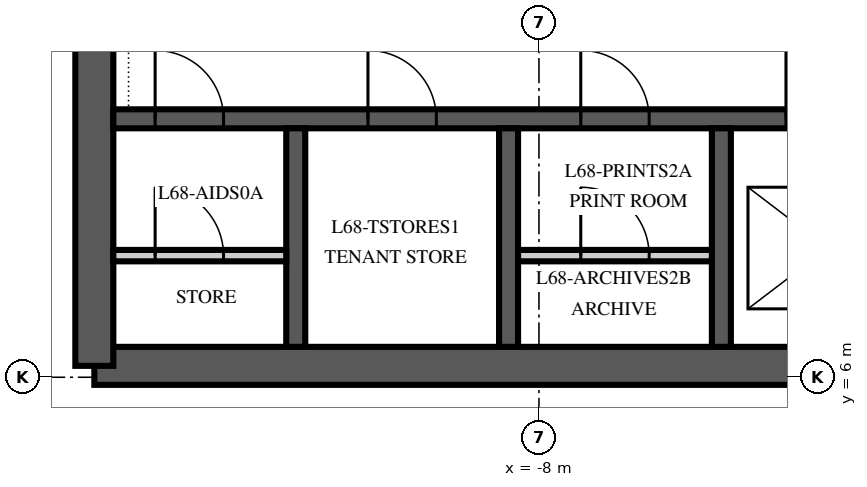
"""IFC4 building model, lengths in metres.
Left out: names, types, materials, properties, quantities, classifications, styles, units other than length and angle.
Written with IfcOpenShell. Run it as: python <this file> out.ifc"""

import sys

from ifc_helpers import new_model, si_unit, direction, frame, frame_2d, origin, place, context, subcontext, project, spatial, polyline, rectangle, outline, extrude, element, fill, save


model = new_model("IFC4")
c1 = context("Model", 3, precision=1e-05, world=origin(), true_north=direction((0.0, 1.0)))
c2 = subcontext(c1, "Body", "Model", "MODEL_VIEW")
j1 = project(units=[si_unit("LENGTHUNIT", "METRE"), si_unit("PLANEANGLEUNIT", "RADIAN")], contexts=[c1])
p1 = place(None, origin())
s1 = spatial("IfcSite", under=j1, at=p1, CompositionType="ELEMENT")
p2 = place(p1, origin())
s2 = spatial("IfcBuilding", under=s1, at=p2, CompositionType="ELEMENT")
p3 = place(p2, frame((0.0, 0.0, 292.0)))
s3 = spatial("IfcBuildingStorey", under=s2, at=p3, CompositionType="ELEMENT", Elevation=292.0)
p4 = place(p3, frame((-13.85, 6.15, 0.0), z_axis=(0.0, 0.0, 1.0), x_axis=(1.0, 0.0, 0.0)))
e1 = element("IfcWall", 1, at=p4, inside=s3, PredefinedType="SHEAR", context=c2, shape_type="SweptSolid", body=[
    extrude(rectangle(XDim=27.7, YDim=0.5, at=frame_2d((13.85, 0.0))), origin(), (0.0, 0.0, 1.0), 4.0),
])
p5 = place(p3, frame((-13.85, 23.85, 0.0), z_axis=(0.0, 0.0, 1.0), x_axis=(0.0, -1.0, 0.0)))
e2 = element("IfcWall", 2, at=p5, inside=s3, PredefinedType="SHEAR", context=c2, shape_type="SweptSolid", body=[
    extrude(outline(polyline([(0.0, -0.25), (17.7, -0.25), (17.7, 0.0), (17.45, 0.0), (17.45, 0.25), (0.25, 0.25), (0.25, 0.0), (0.0, 0.0), (0.0, -0.25)])), origin(), (0.0, 0.0, 1.0), 4.0),
])
p6 = place(p5, frame((11.75, 0.0, 0.0)))
e3 = element("IfcOpeningElement", 3, at=p6, cuts=e2, PredefinedType="OPENING", context=c2, shape_type="SweptSolid", body=[
    extrude(rectangle(XDim=1.8, YDim=2.4, at=frame_2d((0.9, 1.2))), frame((0.0, 0.265, 0.0), z_axis=(0.0, -1.0, 0.0), x_axis=(1.0, 0.0, 0.0)), (0.0, 0.0, 1.0), 0.53),
])
p7 = place(p3, frame((-13.6, 9.4, 0.0), z_axis=(0.0, 0.0, 1.0), x_axis=(1.0, 0.0, 0.0)))
e4 = element("IfcWall", 4, at=p7, inside=s3, PredefinedType="SHEAR", context=c2, shape_type="SweptSolid", body=[
    extrude(rectangle(XDim=27.2, YDim=0.25, at=frame_2d((13.6, 0.0))), origin(), (0.0, 0.0, 1.0), 4.0),
])
p8 = place(p7, frame((8.85, 0.0, 0.0)))
e5 = element("IfcOpeningElement", 5, at=p8, cuts=e4, PredefinedType="OPENING", context=c2, shape_type="SweptSolid", body=[
    extrude(rectangle(XDim=1.1, YDim=2.1, at=frame_2d((0.55, 1.05))), frame((0.0, 0.14, 0.0), z_axis=(0.0, -1.0, 0.0), x_axis=(1.0, 0.0, 0.0)), (0.0, 0.0, 1.0), 0.28),
])
p9 = place(p7, frame((11.65, 0.0, 0.0)))
e6 = element("IfcOpeningElement", 6, at=p9, cuts=e4, PredefinedType="OPENING", context=c2, shape_type="SweptSolid", body=[
    extrude(rectangle(XDim=1.1, YDim=2.1, at=frame_2d((0.55, 1.05))), frame((0.0, 0.14, 0.0), z_axis=(0.0, -1.0, 0.0), x_axis=(1.0, 0.0, 0.0)), (0.0, 0.0, 1.0), 0.28),
])
p10 = place(p7, frame((14.45, 0.0, 0.0)))
e7 = element("IfcOpeningElement", 7, at=p10, cuts=e4, PredefinedType="OPENING", context=c2, shape_type="SweptSolid", body=[
    extrude(rectangle(XDim=1.1, YDim=2.1, at=frame_2d((0.55, 1.05))), frame((0.0, 0.14, 0.0), z_axis=(0.0, -1.0, 0.0), x_axis=(1.0, 0.0, 0.0)), (0.0, 0.0, 1.0), 0.28),
])
p11 = place(p7, frame((0.55, 0.0, 0.0)))
e8 = element("IfcOpeningElement", 8, at=p11, cuts=e4, PredefinedType="OPENING", context=c2, shape_type="SweptSolid", body=[
    extrude(rectangle(XDim=0.9, YDim=2.1, at=frame_2d((0.45, 1.05))), frame((0.0, 0.14, 0.0), z_axis=(0.0, -1.0, 0.0), x_axis=(1.0, 0.0, 0.0)), (0.0, 0.0, 1.0), 0.28),
])
p12 = place(p7, frame((3.35, 0.0, 0.0)))
e9 = element("IfcOpeningElement", 9, at=p12, cuts=e4, PredefinedType="OPENING", context=c2, shape_type="SweptSolid", body=[
    extrude(rectangle(XDim=0.9, YDim=2.1, at=frame_2d((0.45, 1.05))), frame((0.0, 0.14, 0.0), z_axis=(0.0, -1.0, 0.0), x_axis=(1.0, 0.0, 0.0)), (0.0, 0.0, 1.0), 0.28),
])
p13 = place(p7, frame((6.15, 0.0, 0.0)))
e10 = element("IfcOpeningElement", 10, at=p13, cuts=e4, PredefinedType="OPENING", context=c2, shape_type="SweptSolid", body=[
    extrude(rectangle(XDim=0.9, YDim=2.1, at=frame_2d((0.45, 1.05))), frame((0.0, 0.14, 0.0), z_axis=(0.0, -1.0, 0.0), x_axis=(1.0, 0.0, 0.0)), (0.0, 0.0, 1.0), 0.28),
])
p14 = place(p7, frame((17.35, 0.0, 0.0)))
e11 = element("IfcOpeningElement", 11, at=p14, cuts=e4, PredefinedType="OPENING", context=c2, shape_type="SweptSolid", body=[
    extrude(rectangle(XDim=0.9, YDim=2.1, at=frame_2d((0.45, 1.05))), frame((0.0, 0.14, 0.0), z_axis=(0.0, -1.0, 0.0), x_axis=(1.0, 0.0, 0.0)), (0.0, 0.0, 1.0), 0.28),
])
p15 = place(p7, frame((20.15, 0.0, 0.0)))
e12 = element("IfcOpeningElement", 12, at=p15, cuts=e4, PredefinedType="OPENING", context=c2, shape_type="SweptSolid", body=[
    extrude(rectangle(XDim=0.9, YDim=2.1, at=frame_2d((0.45, 1.05))), frame((0.0, 0.14, 0.0), z_axis=(0.0, -1.0, 0.0), x_axis=(1.0, 0.0, 0.0)), (0.0, 0.0, 1.0), 0.28),
])
p16 = place(p7, frame((22.95, 0.0, 0.0)))
e13 = element("IfcOpeningElement", 13, at=p16, cuts=e4, PredefinedType="OPENING", context=c2, shape_type="SweptSolid", body=[
    extrude(rectangle(XDim=0.9, YDim=2.1, at=frame_2d((0.45, 1.05))), frame((0.0, 0.14, 0.0), z_axis=(0.0, -1.0, 0.0), x_axis=(1.0, 0.0, 0.0)), (0.0, 0.0, 1.0), 0.28),
])
for number, where, z_axis, x_axis in (
    (14, (-11.2, 6.4, 0.0), (0.0, 0.0, 1.0), (0.0, 1.0, 0.0)),
    (15, (-8.4, 6.4, 0.0), (0.0, 0.0, 1.0), (0.0, 1.0, 0.0)),
    (16, (-5.6, 6.4, 0.0), (0.0, 0.0, 1.0), (0.0, 1.0, 0.0)),
):
    element("IfcWall", number, at=place(p3, frame(where, z_axis=z_axis, x_axis=x_axis)), inside=s3, PredefinedType="SHEAR", context=c2, shape_type="SweptSolid", body=[
        extrude(rectangle(XDim=2.875, YDim=0.25, at=frame_2d((1.438, 0.0))), origin(), (0.0, 0.0, 1.0), 4.0),
    ])
p17 = place(p3, frame((-13.6, 7.6, 0.0), z_axis=(0.0, 0.0, 1.0), x_axis=(1.0, 0.0, 0.0)))
e17 = element("IfcWall", 17, at=p17, inside=s3, PredefinedType="PARTITIONING", context=c2, shape_type="SweptSolid", body=[
    extrude(rectangle(XDim=2.275, YDim=0.15, at=frame_2d((1.138, 0.0))), origin(), (0.0, 0.0, 1.0), 3.85),
])
p18 = place(p17, frame((0.55, 0.0, 0.0)))
e18 = element("IfcOpeningElement", 18, at=p18, cuts=e17, PredefinedType="OPENING", context=c2, shape_type="SweptSolid", body=[
    extrude(rectangle(XDim=0.9, YDim=2.1, at=frame_2d((0.45, 1.05))), frame((0.0, 0.09, 0.0), z_axis=(0.0, -1.0, 0.0), x_axis=(1.0, 0.0, 0.0)), (0.0, 0.0, 1.0), 0.18),
])
p19 = place(p3, frame((-8.275, 7.6, 0.0), z_axis=(0.0, 0.0, 1.0), x_axis=(1.0, 0.0, 0.0)))
e19 = element("IfcWall", 19, at=p19, inside=s3, PredefinedType="PARTITIONING", context=c2, shape_type="SweptSolid", body=[
    extrude(rectangle(XDim=2.55, YDim=0.15, at=frame_2d((1.275, 0.0))), origin(), (0.0, 0.0, 1.0), 3.85),
])
p20 = place(p19, frame((0.825, 0.0, 0.0)))
e20 = element("IfcOpeningElement", 20, at=p20, cuts=e19, PredefinedType="OPENING", context=c2, shape_type="SweptSolid", body=[
    extrude(rectangle(XDim=0.9, YDim=2.1, at=frame_2d((0.45, 1.05))), frame((0.0, 0.09, 0.0), z_axis=(0.0, -1.0, 0.0), x_axis=(1.0, 0.0, 0.0)), (0.0, 0.0, 1.0), 0.18),
])
p21 = place(p8, origin())
e21 = element("IfcDoor", 21, at=p21, inside=s3, OperationType="SLIDING_TO_LEFT", PredefinedType="DOOR", context=c2, shape_type="SweptSolid", body=[
    extrude(rectangle(XDim=1.1, YDim=2.1, at=frame_2d((0.55, 1.05))), frame((0.0, 0.125, 0.0), z_axis=(0.0, -1.0, 0.0), x_axis=(1.0, 0.0, 0.0)), (0.0, 0.0, 1.0), 0.25),
])
fill(e5, e21)
p22 = place(p11, origin())
e22 = element("IfcDoor", 22, at=p22, inside=s3, OperationType="SINGLE_SWING_LEFT", PredefinedType="DOOR", context=c2, shape_type="SweptSolid", body=[
    extrude(rectangle(XDim=0.9, YDim=2.1, at=frame_2d((0.45, 1.05))), frame((0.0, 0.125, 0.0), z_axis=(0.0, -1.0, 0.0), x_axis=(1.0, 0.0, 0.0)), (0.0, 0.0, 1.0), 0.25),
])
fill(e8, e22)
p23 = place(p18, origin())
e23 = element("IfcDoor", 23, at=p23, inside=s3, OperationType="SINGLE_SWING_LEFT", PredefinedType="DOOR", context=c2, shape_type="SweptSolid", body=[
    extrude(rectangle(XDim=0.9, YDim=2.1, at=frame_2d((0.45, 1.05))), frame((0.0, 0.075, 0.0), z_axis=(0.0, -1.0, 0.0), x_axis=(1.0, 0.0, 0.0)), (0.0, 0.0, 1.0), 0.149),
])
fill(e18, e23)
p24 = place(p12, origin())
e24 = element("IfcDoor", 24, at=p24, inside=s3, OperationType="SINGLE_SWING_LEFT", PredefinedType="DOOR", context=c2, shape_type="SweptSolid", body=[
    extrude(rectangle(XDim=0.9, YDim=2.1, at=frame_2d((0.45, 1.05))), frame((0.0, 0.125, 0.0), z_axis=(0.0, -1.0, 0.0), x_axis=(1.0, 0.0, 0.0)), (0.0, 0.0, 1.0), 0.25),
])
fill(e9, e24)
p25 = place(p13, origin())
e25 = element("IfcDoor", 25, at=p25, inside=s3, OperationType="SINGLE_SWING_LEFT", PredefinedType="DOOR", context=c2, shape_type="SweptSolid", body=[
    extrude(rectangle(XDim=0.9, YDim=2.1, at=frame_2d((0.45, 1.05))), frame((0.0, 0.125, 0.0), z_axis=(0.0, -1.0, 0.0), x_axis=(1.0, 0.0, 0.0)), (0.0, 0.0, 1.0), 0.25),
])
fill(e10, e25)
p26 = place(p20, origin())
e26 = element("IfcDoor", 26, at=p26, inside=s3, OperationType="SINGLE_SWING_LEFT", PredefinedType="DOOR", context=c2, shape_type="SweptSolid", body=[
    extrude(rectangle(XDim=0.9, YDim=2.1, at=frame_2d((0.45, 1.05))), frame((0.0, 0.075, 0.0), z_axis=(0.0, -1.0, 0.0), x_axis=(1.0, 0.0, 0.0)), (0.0, 0.0, 1.0), 0.149),
])
fill(e20, e26)
save(model, sys.argv[1])
